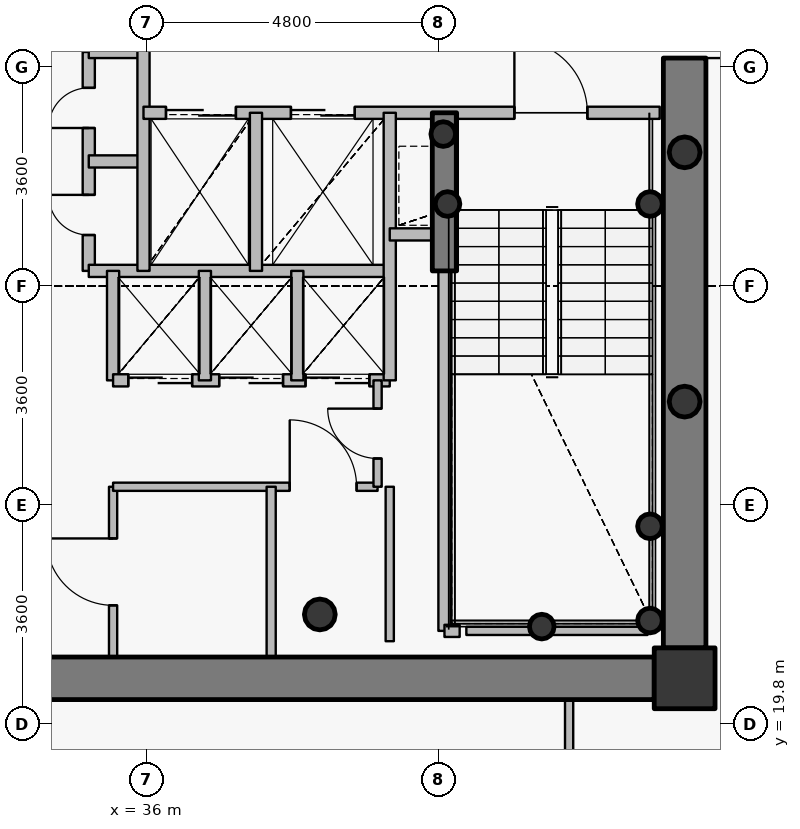
"""IFC4 building model, lengths in metres.
Left out: names, types, materials, properties, quantities, classifications, styles, units other than length and angle.
Written with IfcOpenShell. Run it as: python <this file> out.ifc"""

import sys

from ifc_helpers import new_model, si_unit, direction, frame, frame_2d, origin, origin_2d, place, context, subcontext, project, spatial, rectangle, hollow_circle, extrude, source, transform, mapped, element, fill, save


model = new_model("IFC4")
c1 = context("Model", 3, precision=1e-05, world=origin(), true_north=direction((0.0, 1.0)))
c2 = subcontext(c1, "Body", "Model", "MODEL_VIEW")
j1 = project(units=[si_unit("LENGTHUNIT", "METRE"), si_unit("PLANEANGLEUNIT", "RADIAN")], contexts=[c1])
p1 = place(None, origin())
s1 = spatial("IfcSite", under=j1, at=p1, CompositionType="ELEMENT")
p2 = place(p1, origin())
s2 = spatial("IfcBuilding", under=s1, at=p2, CompositionType="ELEMENT")
p3 = place(p2, frame((0.0, 0.0, 318.0)))
s3 = spatial("IfcBuildingStorey", under=s2, at=p3, CompositionType="ELEMENT", Elevation=318.0)
p4 = place(p3, frame((44.85, 20.55, 0.0), z_axis=(0.0, 0.0, 1.0), x_axis=(1.0, 0.0, 0.0)))
e1 = element("IfcColumn", 1, at=p4, inside=s3, PredefinedType="COLUMN", context=c2, shape_type="SweptSolid", body=[
    extrude(rectangle(XDim=1.0, YDim=1.0, at=origin_2d()), origin(), (0.0, 0.0, 1.0), 6.0),
])
p5 = place(p3, frame((38.85, 21.6, 0.0), z_axis=(0.0, 0.0, 1.0), x_axis=(1.0, 0.0, 0.0)))
e2 = element("IfcColumn", 2, at=p5, inside=s3, PredefinedType="COLUMN", context=c2, shape_type="SweptSolid", body=[
    extrude(hollow_circle(Radius=0.254, WallThickness=0.02, at=origin_2d()), origin(), (0.0, 0.0, 1.0), 6.0),
])
for number, where, z_axis, x_axis in (
    (3, (44.28, 21.5, 0.0), (0.0, 0.0, 1.0), (1.0, 0.0, 0.0)),
    (4, (44.28, 23.05, 0.0), (0.0, 0.0, 1.0), (1.0, 0.0, 0.0)),
    (5, (42.5, 21.4, 0.0), (0.0, 0.0, 1.0), (1.0, 0.0, 0.0)),
    (6, (40.95, 28.35, 0.0), (0.0, 0.0, 1.0), (1.0, 0.0, 0.0)),
    (7, (44.28, 28.35, 0.0), (0.0, 0.0, 1.0), (1.0, 0.0, 0.0)),
    (8, (40.88, 29.5, 0.0), (0.0, 0.0, 1.0), (1.0, 0.0, 0.0)),
):
    element("IfcColumn", number, at=place(p3, frame(where, z_axis=z_axis, x_axis=x_axis)), inside=s3, PredefinedType="COLUMN", context=c2, shape_type="SweptSolid", body=[
        extrude(hollow_circle(Radius=0.203, WallThickness=0.016, at=origin_2d()), origin(), (0.0, 0.0, 1.0), 6.0),
    ])
p6 = place(p3, frame((44.85, 32.95, 0.0), z_axis=(0.0, 0.0, 1.0), x_axis=(0.0, -1.0, 0.0)))
e9 = element("IfcWall", 9, at=p6, inside=s3, PredefinedType="SHEAR", context=c2, shape_type="SweptSolid", body=[
    extrude(rectangle(XDim=11.9, YDim=0.7, at=frame_2d((5.95, 0.0))), origin(), (0.0, 0.0, 1.0), 5.3),
])
p7 = place(p6, frame((1.05, 0.0, 0.0)))
e10 = element("IfcOpeningElement", 10, at=p7, cuts=e9, PredefinedType="OPENING", context=c2, shape_type="SweptSolid", body=[
    extrude(rectangle(XDim=1.15, YDim=2.15, at=origin_2d()), frame((0.575, 0.36, 1.075), z_axis=(0.0, -1.0, 0.0), x_axis=(1.0, 0.0, 0.0)), (0.0, 0.0, 1.0), 0.72),
])
p8 = place(p3, frame((44.35, 20.55, 0.0), z_axis=(0.0, 0.0, 1.0), x_axis=(-1.0, 0.0, 0.0)))
e11 = element("IfcWall", 11, at=p8, inside=s3, PredefinedType="SHEAR", context=c2, shape_type="SweptSolid", body=[
    extrude(rectangle(XDim=16.7, YDim=0.7, at=frame_2d((8.35, 0.0))), origin(), (0.0, 0.0, 1.0), 5.3),
])
p9 = place(p8, frame((12.3, 0.0, 0.0)))
e12 = element("IfcOpeningElement", 12, at=p9, cuts=e11, PredefinedType="OPENING", context=c2, shape_type="SweptSolid", body=[
    extrude(rectangle(XDim=1.15, YDim=2.15, at=origin_2d()), frame((0.575, 0.36, 1.075), z_axis=(0.0, -1.0, 0.0), x_axis=(1.0, 0.0, 0.0)), (0.0, 0.0, 1.0), 0.72),
])
p10 = place(p3, frame((40.9, 27.25, 0.0), z_axis=(0.0, 0.0, 1.0), x_axis=(0.0, 1.0, 0.0)))
e13 = element("IfcWall", 13, at=p10, inside=s3, PredefinedType="SHEAR", context=c2, shape_type="SweptSolid", body=[
    extrude(rectangle(XDim=2.6, YDim=0.4, at=frame_2d((1.3, 0.0))), origin(), (0.0, 0.0, 1.0), 5.35),
])
for number, where, z_axis, x_axis in (
    (14, (44.85, 25.1, 0.0), (0.0, 0.0, 1.0), (1.0, 0.0, 0.0)),
    (15, (44.85, 29.2, 0.0), (0.0, 0.0, 1.0), (1.0, 0.0, 0.0)),
):
    element("IfcColumn", number, at=place(p3, frame(where, z_axis=z_axis, x_axis=x_axis)), inside=s3, PredefinedType="COLUMN", context=c2, shape_type="SweptSolid", body=[
        extrude(hollow_circle(Radius=0.254, WallThickness=0.02, at=origin_2d()), origin(), (0.0, 0.0, 1.0), 6.0),
    ])
p11 = place(p3, frame((35.05, 27.25, 0.0), z_axis=(0.0, 0.0, 1.0), x_axis=(0.0, 1.0, 0.0)))
e16 = element("IfcWall", 16, at=p11, inside=s3, PredefinedType="PARTITIONING", context=c2, shape_type="SweptSolid", body=[
    extrude(rectangle(XDim=3.6, YDim=0.2, at=frame_2d((1.8, 0.0))), origin(), (0.0, 0.0, 1.0), 5.75),
])
p12 = place(p11, frame((0.59, 0.0, 0.0)))
e17 = element("IfcOpeningElement", 17, at=p12, cuts=e16, PredefinedType="OPENING", context=c2, shape_type="SweptSolid", body=[
    extrude(rectangle(XDim=0.66, YDim=2.05, at=origin_2d()), frame((0.33, 0.11, 1.025), z_axis=(0.0, -1.0, 0.0), x_axis=(1.0, 0.0, 0.0)), (0.0, 0.0, 1.0), 0.22),
])
p13 = place(p11, frame((2.35, 0.0, 0.0)))
e18 = element("IfcOpeningElement", 18, at=p13, cuts=e16, PredefinedType="OPENING", context=c2, shape_type="SweptSolid", body=[
    extrude(rectangle(XDim=0.66, YDim=2.05, at=origin_2d()), frame((0.33, 0.11, 1.025), z_axis=(0.0, -1.0, 0.0), x_axis=(1.0, 0.0, 0.0)), (0.0, 0.0, 1.0), 0.22),
])
p14 = place(p3, frame((35.05, 27.25, 0.0), z_axis=(0.0, 0.0, 1.0), x_axis=(1.0, 0.0, 0.0)))
e19 = element("IfcWall", 19, at=p14, inside=s3, PredefinedType="PARTITIONING", context=c2, shape_type="SweptSolid", body=[
    extrude(rectangle(XDim=4.95, YDim=0.2, at=frame_2d((2.475, 0.0))), origin(), (0.0, 0.0, 1.0), 5.335),
])
for number, where, z_axis, x_axis in (
    (20, (35.05, 29.05, 0.0), (0.0, 0.0, 1.0), (1.0, 0.0, 0.0)),
    (21, (35.05, 30.85, 0.0), (0.0, 0.0, 1.0), (1.0, 0.0, 0.0)),
):
    element("IfcWall", number, at=place(p3, frame(where, z_axis=z_axis, x_axis=x_axis)), inside=s3, PredefinedType="PARTITIONING", context=c2, shape_type="SweptSolid", body=[
        extrude(rectangle(XDim=0.9, YDim=0.2, at=frame_2d((0.45, 0.0))), origin(), (0.0, 0.0, 1.0), 5.75),
    ])
p15 = place(p3, frame((35.45, 20.9, 0.0), z_axis=(0.0, 0.0, 1.0), x_axis=(0.0, 1.0, 0.0)))
e22 = element("IfcWall", 22, at=p15, inside=s3, PredefinedType="PARTITIONING", context=c2, shape_type="SweptSolid", body=[
    extrude(rectangle(XDim=2.8, YDim=0.135, at=frame_2d((1.4, 0.0))), origin(), (0.0, 0.0, 1.0), 5.335),
])
p16 = place(p15, frame((0.85, 0.0, 0.0)))
e23 = element("IfcOpeningElement", 23, at=p16, cuts=e22, PredefinedType="OPENING", context=c2, shape_type="SweptSolid", body=[
    extrude(rectangle(XDim=1.1, YDim=2.15, at=origin_2d()), frame((0.55, 0.078, 1.075), z_axis=(0.0, -1.0, 0.0), x_axis=(1.0, 0.0, 0.0)), (0.0, 0.0, 1.0), 0.155),
])
p17 = place(p3, frame((35.45, 23.7, 0.0), z_axis=(0.0, 0.0, 1.0), x_axis=(1.0, 0.0, 0.0)))
e24 = element("IfcWall", 24, at=p17, inside=s3, PredefinedType="PARTITIONING", context=c2, shape_type="SweptSolid", body=[
    extrude(rectangle(XDim=4.35, YDim=0.135, at=frame_2d((2.175, 0.0))), origin(), (0.0, 0.0, 1.0), 5.335),
])
p18 = place(p17, frame((2.905, 0.0, 0.0)))
e25 = element("IfcOpeningElement", 25, at=p18, cuts=e24, PredefinedType="OPENING", context=c2, shape_type="SweptSolid", body=[
    extrude(rectangle(XDim=1.1, YDim=2.15, at=origin_2d()), frame((0.55, 0.078, 1.075), z_axis=(0.0, -1.0, 0.0), x_axis=(1.0, 0.0, 0.0)), (0.0, 0.0, 1.0), 0.155),
])
p19 = place(p3, frame((35.45, 25.45, 0.0), z_axis=(0.0, 0.0, 1.0), x_axis=(0.0, 1.0, 0.0)))
e26 = element("IfcWall", 26, at=p19, inside=s3, PredefinedType="PARTITIONING", context=c2, shape_type="SweptSolid", body=[
    extrude(rectangle(XDim=1.8, YDim=0.2, at=frame_2d((0.9, 0.0))), origin(), (0.0, 0.0, 1.0), 5.75),
])
p20 = place(p3, frame((35.45, 25.45, 0.0), z_axis=(0.0, 0.0, 1.0), x_axis=(1.0, 0.0, 0.0)))
e27 = element("IfcWall", 27, at=p20, inside=s3, PredefinedType="PARTITIONING", context=c2, shape_type="SweptSolid", body=[
    extrude(rectangle(XDim=4.55, YDim=0.2, at=frame_2d((2.275, 0.0))), origin(), (0.0, 0.0, 1.0), 5.335),
])
p21 = place(p20, frame((0.25, 0.0, 0.0)))
e28 = element("IfcOpeningElement", 28, at=p21, cuts=e27, PredefinedType="OPENING", context=c2, shape_type="SweptSolid", body=[
    extrude(rectangle(XDim=1.05, YDim=2.15, at=origin_2d()), frame((0.525, 0.11, 1.075), z_axis=(0.0, -1.0, 0.0), x_axis=(1.0, 0.0, 0.0)), (0.0, 0.0, 1.0), 0.22),
])
p22 = place(p20, frame((1.745, 0.0, 0.0)))
e29 = element("IfcOpeningElement", 29, at=p22, cuts=e27, PredefinedType="OPENING", context=c2, shape_type="SweptSolid", body=[
    extrude(rectangle(XDim=1.05, YDim=2.15, at=origin_2d()), frame((0.525, 0.11, 1.075), z_axis=(0.0, -1.0, 0.0), x_axis=(1.0, 0.0, 0.0)), (0.0, 0.0, 1.0), 0.22),
])
p23 = place(p20, frame((3.165, 0.0, 0.0)))
e30 = element("IfcOpeningElement", 30, at=p23, cuts=e27, PredefinedType="OPENING", context=c2, shape_type="SweptSolid", body=[
    extrude(rectangle(XDim=1.05, YDim=2.15, at=origin_2d()), frame((0.525, 0.11, 1.075), z_axis=(0.0, -1.0, 0.0), x_axis=(1.0, 0.0, 0.0)), (0.0, 0.0, 1.0), 0.22),
])
p24 = place(p3, frame((35.95, 27.25, 0.0), z_axis=(0.0, 0.0, 1.0), x_axis=(0.0, 1.0, 0.0)))
e31 = element("IfcWall", 31, at=p24, inside=s3, PredefinedType="PARTITIONING", context=c2, shape_type="SweptSolid", body=[
    extrude(rectangle(XDim=3.8, YDim=0.2, at=frame_2d((1.9, 0.0))), origin(), (0.0, 0.0, 1.0), 5.75),
])
p25 = place(p3, frame((35.95, 29.85, 0.0), z_axis=(0.0, 0.0, 1.0), x_axis=(1.0, 0.0, 0.0)))
e32 = element("IfcWall", 32, at=p25, inside=s3, PredefinedType="PARTITIONING", context=c2, shape_type="SweptSolid", body=[
    extrude(rectangle(XDim=8.49, YDim=0.2, at=frame_2d((4.245, 0.0))), origin(), (0.0, 0.0, 1.0), 5.335),
])
p26 = place(p25, frame((6.1, 0.0, 0.0)))
e33 = element("IfcOpeningElement", 33, at=p26, cuts=e32, PredefinedType="OPENING", context=c2, shape_type="SweptSolid", body=[
    extrude(rectangle(XDim=1.2, YDim=2.15, at=origin_2d()), frame((0.6, 0.11, 1.075), z_axis=(0.0, -1.0, 0.0), x_axis=(1.0, 0.0, 0.0)), (0.0, 0.0, 1.0), 0.22),
])
p27 = place(p25, frame((0.37, 0.0, 0.0)))
e34 = element("IfcOpeningElement", 34, at=p27, cuts=e32, PredefinedType="OPENING", context=c2, shape_type="SweptSolid", body=[
    extrude(rectangle(XDim=1.15, YDim=2.15, at=origin_2d()), frame((0.575, 0.11, 1.075), z_axis=(0.0, -1.0, 0.0), x_axis=(1.0, 0.0, 0.0)), (0.0, 0.0, 1.0), 0.22),
])
p28 = place(p25, frame((2.425, 0.0, 0.0)))
e35 = element("IfcOpeningElement", 35, at=p28, cuts=e32, PredefinedType="OPENING", context=c2, shape_type="SweptSolid", body=[
    extrude(rectangle(XDim=1.05, YDim=2.15, at=origin_2d()), frame((0.525, 0.11, 1.075), z_axis=(0.0, -1.0, 0.0), x_axis=(1.0, 0.0, 0.0)), (0.0, 0.0, 1.0), 0.22),
])
p29 = place(p3, frame((36.96, 25.45, 0.0), z_axis=(0.0, 0.0, 1.0), x_axis=(0.0, 1.0, 0.0)))
e36 = element("IfcWall", 36, at=p29, inside=s3, PredefinedType="PARTITIONING", context=c2, shape_type="SweptSolid", body=[
    extrude(rectangle(XDim=1.8, YDim=0.2, at=frame_2d((0.9, 0.0))), origin(), (0.0, 0.0, 1.0), 5.75),
])
p30 = place(p3, frame((37.8, 27.25, 0.0), z_axis=(0.0, 0.0, 1.0), x_axis=(0.0, 1.0, 0.0)))
e37 = element("IfcWall", 37, at=p30, inside=s3, PredefinedType="PARTITIONING", context=c2, shape_type="SweptSolid", body=[
    extrude(rectangle(XDim=2.6, YDim=0.2, at=frame_2d((1.3, 0.0))), origin(), (0.0, 0.0, 1.0), 5.75),
])
p31 = place(p3, frame((38.05, 20.38, 0.0), z_axis=(0.0, 0.0, 1.0), x_axis=(0.0, 1.0, 0.0)))
e38 = element("IfcWall", 38, at=p31, inside=s3, PredefinedType="PARTITIONING", context=c2, shape_type="SweptSolid", body=[
    extrude(rectangle(XDim=3.32, YDim=0.15, at=frame_2d((1.66, 0.0))), origin(), (0.0, 0.0, 1.0), 5.285),
])
p32 = place(p3, frame((38.48, 25.45, 0.0), z_axis=(0.0, 0.0, 1.0), x_axis=(0.0, 1.0, 0.0)))
e39 = element("IfcWall", 39, at=p32, inside=s3, PredefinedType="PARTITIONING", context=c2, shape_type="SweptSolid", body=[
    extrude(rectangle(XDim=1.8, YDim=0.2, at=frame_2d((0.9, 0.0))), origin(), (0.0, 0.0, 1.0), 5.75),
])
p33 = place(p3, frame((39.8, 23.7, 0.0), z_axis=(0.0, 0.0, 1.0), x_axis=(0.0, 1.0, 0.0)))
e40 = element("IfcWall", 40, at=p33, inside=s3, PredefinedType="PARTITIONING", context=c2, shape_type="SweptSolid", body=[
    extrude(rectangle(XDim=1.75, YDim=0.135, at=frame_2d((0.875, 0.0))), origin(), (0.0, 0.0, 1.0), 5.75),
])
p34 = place(p33, frame((0.465, 0.0, 0.0)))
e41 = element("IfcOpeningElement", 41, at=p34, cuts=e40, PredefinedType="OPENING", context=c2, shape_type="SweptSolid", body=[
    extrude(rectangle(XDim=0.82, YDim=2.1, at=origin_2d()), frame((0.41, 0.078, 1.05), z_axis=(0.0, -1.0, 0.0), x_axis=(1.0, 0.0, 0.0)), (0.0, 0.0, 1.0), 0.155),
])
p35 = place(p3, frame((40.0, 25.45, 0.0), z_axis=(0.0, 0.0, 1.0), x_axis=(0.0, 1.0, 0.0)))
e42 = element("IfcWall", 42, at=p35, inside=s3, PredefinedType="PARTITIONING", context=c2, shape_type="SweptSolid", body=[
    extrude(rectangle(XDim=4.4, YDim=0.2, at=frame_2d((2.2, 0.0))), origin(), (0.0, 0.0, 1.0), 5.75),
])
p36 = place(p3, frame((40.0, 27.85, 0.0), z_axis=(0.0, 0.0, 1.0), x_axis=(1.0, 0.0, 0.0)))
e43 = element("IfcWall", 43, at=p36, inside=s3, PredefinedType="PARTITIONING", context=c2, shape_type="SweptSolid", body=[
    extrude(rectangle(XDim=0.9, YDim=0.2, at=frame_2d((0.45, 0.0))), origin(), (0.0, 0.0, 1.0), 5.75),
])
p37 = place(p3, frame((40.9, 21.33, 0.0), z_axis=(0.0, 0.0, 1.0), x_axis=(0.0, 1.0, 0.0)))
e44 = element("IfcWall", 44, at=p37, inside=s3, PredefinedType="PARTITIONING", context=c2, shape_type="SweptSolid", body=[
    extrude(rectangle(XDim=5.91, YDim=0.2, at=frame_2d((2.955, 0.0))), origin(), (0.0, 0.0, 1.0), 5.285),
])
p38 = place(p3, frame((40.9, 21.33, 0.0), z_axis=(0.0, 0.0, 1.0), x_axis=(1.0, 0.0, 0.0)))
e45 = element("IfcWall", 45, at=p38, inside=s3, PredefinedType="PARTITIONING", context=c2, shape_type="SweptSolid", body=[
    extrude(rectangle(XDim=0.25, YDim=0.2, at=frame_2d((0.125, 0.0))), origin(), (0.0, 0.0, 1.0), 5.285),
])
p39 = place(p3, frame((42.95, 17.3, 0.0), z_axis=(0.0, 0.0, 1.0), x_axis=(0.0, 1.0, 0.0)))
e46 = element("IfcWall", 46, at=p39, inside=s3, PredefinedType="PARTITIONING", context=c2, shape_type="SweptSolid", body=[
    extrude(rectangle(XDim=2.9, YDim=0.135, at=frame_2d((1.45, 0.0))), origin(), (0.0, 0.0, 1.0), 5.75),
])
p40 = place(p3, frame((44.24, 21.33, 0.0), z_axis=(0.0, 0.0, 1.0), x_axis=(-1.0, 0.0, 0.0)))
e47 = element("IfcWall", 47, at=p40, inside=s3, PredefinedType="PARTITIONING", context=c2, shape_type="SweptSolid", body=[
    extrude(rectangle(XDim=2.98, YDim=0.135, at=frame_2d((1.49, 0.0))), origin(), (0.0, 0.0, 1.0), 5.285),
])
p41 = place(p3, frame((40.0, 23.7, 0.0), z_axis=(0.0, 0.0, 1.0), x_axis=(0.0, -1.0, 0.0)))
e48 = element("IfcWall", 48, at=p41, inside=s3, PredefinedType="PARTITIONING", context=c2, shape_type="SweptSolid", body=[
    extrude(rectangle(XDim=2.54, YDim=0.135, at=frame_2d((1.27, 0.0))), origin(), (0.0, 0.0, 1.0), 5.285),
])
p42 = place(p3, frame((44.36, 20.2, 0.0), z_axis=(0.0, 0.0, 1.0), x_axis=(1.0, 0.0, 0.0)))
e49 = element("IfcWall", 49, at=p42, inside=s3, PredefinedType="PARTITIONING", context=c2, shape_type="SweptSolid", body=[
    extrude(rectangle(XDim=0.84, YDim=0.135, at=frame_2d((0.42, 0.0))), origin(), (0.0, 0.0, 1.0), 2.832),
])
p43 = place(p3, frame((45.2, 20.508, 0.0), z_axis=(0.0, 0.0, 1.0), x_axis=(0.0, 1.0, 0.0)))
e50 = element("IfcWall", 50, at=p43, inside=s3, PredefinedType="PARTITIONING", context=c2, shape_type="SweptSolid", body=[
    extrude(rectangle(XDim=0.532, YDim=0.135, at=frame_2d((0.266, 0.0))), origin(), (0.0, 0.0, 1.0), 5.75),
])
m1 = source(origin(), c2, "Body", "SweptSolid", [
    extrude(rectangle(XDim=1.15, YDim=2.15, at=origin_2d()), frame((0.575, 0.025, 1.075), z_axis=(0.0, -1.0, 0.0), x_axis=(1.0, 0.0, 0.0)), (0.0, 0.0, 1.0), 0.05),
])
p44 = place(p7, origin())
e51 = element("IfcDoor", 51, at=p44, inside=s3, OperationType="SINGLE_SWING_RIGHT", PredefinedType="DOOR", context=c2, shape_type="MappedRepresentation", body=[
    mapped(m1, transform((0.0, 0.0, 0.0), x_axis=(1.0, 0.0, 0.0), y_axis=(0.0, 1.0, 0.0), z_axis=(0.0, 0.0, 1.0), scale=1.0)),
])
fill(e10, e51)
m2 = source(origin(), c2, "Body", "SweptSolid", [
    extrude(rectangle(XDim=1.2, YDim=2.15, at=origin_2d()), frame((0.6, 0.025, 1.075), z_axis=(0.0, -1.0, 0.0), x_axis=(1.0, 0.0, 0.0)), (0.0, 0.0, 1.0), 0.05),
])
p45 = place(p26, origin())
e52 = element("IfcDoor", 52, at=p45, inside=s3, OperationType="SINGLE_SWING_LEFT", PredefinedType="DOOR", context=c2, shape_type="MappedRepresentation", body=[
    mapped(m2, transform((0.0, 0.0, 0.0), x_axis=(1.0, 0.0, 0.0), y_axis=(0.0, 1.0, 0.0), z_axis=(0.0, 0.0, 1.0), scale=1.0)),
])
fill(e33, e52)
m3 = source(origin(), c2, "Body", "SweptSolid", [
    extrude(rectangle(XDim=1.15, YDim=2.15, at=origin_2d()), frame((0.575, 0.025, 1.075), z_axis=(0.0, -1.0, 0.0), x_axis=(1.0, 0.0, 0.0)), (0.0, 0.0, 1.0), 0.05),
])
p46 = place(p27, origin())
e53 = element("IfcDoor", 53, at=p46, inside=s3, OperationType="DOUBLE_DOOR_SLIDING", PredefinedType="USERDEFINED", context=c2, shape_type="MappedRepresentation", body=[
    mapped(m3, transform((0.0, 0.0, 0.0), x_axis=(1.0, 0.0, 0.0), y_axis=(0.0, 1.0, 0.0), z_axis=(0.0, 0.0, 1.0), scale=1.0)),
])
fill(e34, e53)
m4 = source(origin(), c2, "Body", "SweptSolid", [
    extrude(rectangle(XDim=1.05, YDim=2.15, at=origin_2d()), frame((0.525, 0.025, 1.075), z_axis=(0.0, -1.0, 0.0), x_axis=(1.0, 0.0, 0.0)), (0.0, 0.0, 1.0), 0.05),
])
p47 = place(p28, origin())
e54 = element("IfcDoor", 54, at=p47, inside=s3, OperationType="DOUBLE_DOOR_SLIDING", PredefinedType="USERDEFINED", context=c2, shape_type="MappedRepresentation", body=[
    mapped(m4, transform((0.0, 0.0, 0.0), x_axis=(1.0, 0.0, 0.0), y_axis=(0.0, 1.0, 0.0), z_axis=(0.0, 0.0, 1.0), scale=1.0)),
])
fill(e35, e54)
p48 = place(p21, origin())
e55 = element("IfcDoor", 55, at=p48, inside=s3, OperationType="DOUBLE_DOOR_SLIDING", PredefinedType="USERDEFINED", context=c2, shape_type="MappedRepresentation", body=[
    mapped(m4, transform((0.0, 0.0, 0.0), x_axis=(1.0, 0.0, 0.0), y_axis=(0.0, 1.0, 0.0), z_axis=(0.0, 0.0, 1.0), scale=1.0)),
])
fill(e28, e55)
p49 = place(p22, origin())
e56 = element("IfcDoor", 56, at=p49, inside=s3, OperationType="DOUBLE_DOOR_SLIDING", PredefinedType="USERDEFINED", context=c2, shape_type="MappedRepresentation", body=[
    mapped(m4, transform((0.0, 0.0, 0.0), x_axis=(1.0, 0.0, 0.0), y_axis=(0.0, 1.0, 0.0), z_axis=(0.0, 0.0, 1.0), scale=1.0)),
])
fill(e29, e56)
p50 = place(p23, origin())
e57 = element("IfcDoor", 57, at=p50, inside=s3, OperationType="DOUBLE_DOOR_SLIDING", PredefinedType="USERDEFINED", context=c2, shape_type="MappedRepresentation", body=[
    mapped(m4, transform((0.0, 0.0, 0.0), x_axis=(1.0, 0.0, 0.0), y_axis=(0.0, 1.0, 0.0), z_axis=(0.0, 0.0, 1.0), scale=1.0)),
])
fill(e30, e57)
m5 = source(origin(), c2, "Body", "SweptSolid", [
    extrude(rectangle(XDim=0.66, YDim=2.05, at=origin_2d()), frame((0.33, 0.025, 1.025), z_axis=(0.0, -1.0, 0.0), x_axis=(1.0, 0.0, 0.0)), (0.0, 0.0, 1.0), 0.05),
])
p51 = place(p12, origin())
e58 = element("IfcDoor", 58, at=p51, inside=s3, OperationType="SINGLE_SWING_RIGHT", PredefinedType="USERDEFINED", context=c2, shape_type="MappedRepresentation", body=[
    mapped(m5, transform((0.0, 0.0, 0.0), x_axis=(1.0, 0.0, 0.0), y_axis=(0.0, 1.0, 0.0), z_axis=(0.0, 0.0, 1.0), scale=1.0)),
])
fill(e17, e58)
p52 = place(p13, origin())
e59 = element("IfcDoor", 59, at=p52, inside=s3, OperationType="SINGLE_SWING_LEFT", PredefinedType="USERDEFINED", context=c2, shape_type="MappedRepresentation", body=[
    mapped(m5, transform((0.0, 0.0, 0.0), x_axis=(1.0, 0.0, 0.0), y_axis=(0.0, 1.0, 0.0), z_axis=(0.0, 0.0, 1.0), scale=1.0)),
])
fill(e18, e59)
m6 = source(origin(), c2, "Body", "SweptSolid", [
    extrude(rectangle(XDim=1.1, YDim=2.15, at=origin_2d()), frame((0.55, 0.025, 1.075), z_axis=(0.0, -1.0, 0.0), x_axis=(1.0, 0.0, 0.0)), (0.0, 0.0, 1.0), 0.05),
])
p53 = place(p16, origin())
e60 = element("IfcDoor", 60, at=p53, inside=s3, OperationType="SINGLE_SWING_RIGHT", PredefinedType="DOOR", context=c2, shape_type="MappedRepresentation", body=[
    mapped(m6, transform((0.0, 0.0, 0.0), x_axis=(1.0, 0.0, 0.0), y_axis=(0.0, 1.0, 0.0), z_axis=(0.0, 0.0, 1.0), scale=1.0)),
])
fill(e23, e60)
p54 = place(p18, origin())
e61 = element("IfcDoor", 61, at=p54, inside=s3, OperationType="SINGLE_SWING_LEFT", PredefinedType="DOOR", context=c2, shape_type="MappedRepresentation", body=[
    mapped(m6, transform((0.0, 0.0, 0.0), x_axis=(1.0, 0.0, 0.0), y_axis=(0.0, 1.0, 0.0), z_axis=(0.0, 0.0, 1.0), scale=1.0)),
])
fill(e25, e61)
m7 = source(origin(), c2, "Body", "SweptSolid", [
    extrude(rectangle(XDim=0.82, YDim=2.1, at=origin_2d()), frame((0.41, 0.025, 1.05), z_axis=(0.0, -1.0, 0.0), x_axis=(1.0, 0.0, 0.0)), (0.0, 0.0, 1.0), 0.05),
])
p55 = place(p34, origin())
e62 = element("IfcDoor", 62, at=p55, inside=s3, OperationType="SINGLE_SWING_RIGHT", PredefinedType="DOOR", context=c2, shape_type="MappedRepresentation", body=[
    mapped(m7, transform((0.0, 0.0, 0.0), x_axis=(1.0, 0.0, 0.0), y_axis=(0.0, 1.0, 0.0), z_axis=(0.0, 0.0, 1.0), scale=1.0)),
])
fill(e41, e62)
save(model, sys.argv[1])
